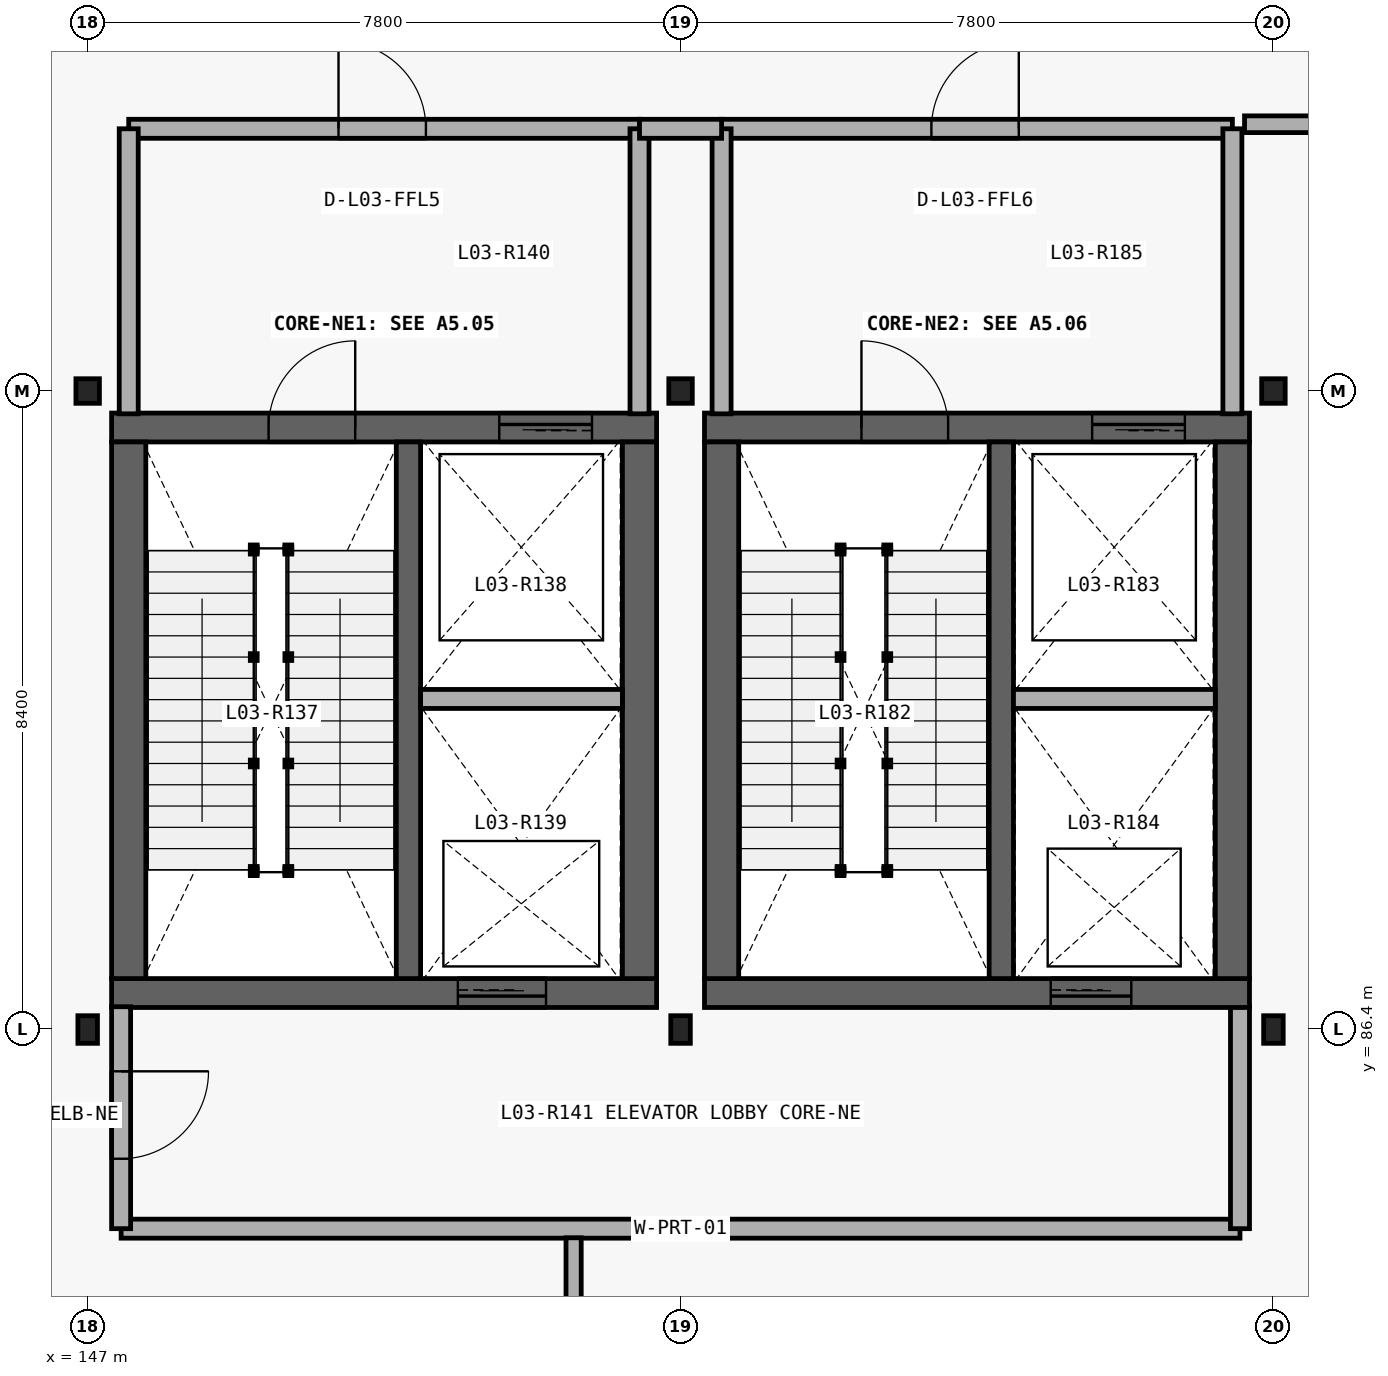
"""IFC4 building model, lengths in metres.
Left out: names, types, materials, properties, quantities, classifications, styles, units other than length and angle.
Written with IfcOpenShell. Run it as: python <this file> out.ifc"""

import sys

from ifc_helpers import new_model, si_unit, direction, frame, frame_2d, origin_with_axes, origin_2d_with_axis, place, context, subcontext, project, spatial, rectangle, i_section, extrude, element, fill, save


model = new_model("IFC4")
c1 = context("Model", 3, precision=1e-05, world=origin_with_axes(), true_north=direction((0.0, 1.0)))
c2 = subcontext(c1, "Body", "Model", "MODEL_VIEW")
j1 = project(units=[si_unit("LENGTHUNIT", "METRE"), si_unit("PLANEANGLEUNIT", "RADIAN")], contexts=[c1])
p1 = place(None, origin_with_axes())
s1 = spatial("IfcSite", under=j1, at=p1, CompositionType="ELEMENT")
p2 = place(p1, origin_with_axes())
s2 = spatial("IfcBuilding", under=s1, at=p2, CompositionType="ELEMENT")
p3 = place(p2, frame((0.0, 0.0, 15.6), z_axis=(0.0, 0.0, 1.0), x_axis=(1.0, 0.0, 0.0)))
s3 = spatial("IfcBuildingStorey", under=s2, at=p3, CompositionType="ELEMENT", Elevation=15.6)
p4 = place(None, frame((147.315, 86.88, 15.6), z_axis=(0.0, 0.0, 1.0), x_axis=(1.0, 0.0, 0.0)))
e1 = element("IfcWall", 1, at=p4, inside=s3, PredefinedType="SHEAR", context=c2, shape_type="SweptSolid", body=[
    extrude(rectangle(XDim=7.17, YDim=0.38, at=frame_2d((3.585, 0.0), x_axis=(1.0, 0.0))), origin_with_axes(), (0.0, 0.0, 1.0), 4.8),
])
p5 = place(None, frame((152.45, 86.88, 15.6), z_axis=(0.0, 0.0, 1.0), x_axis=(1.0, 0.0, 0.0)))
e2 = element("IfcOpeningElement", 2, at=p5, cuts=e1, PredefinedType="OPENING", context=c2, shape_type="SweptSolid", body=[
    extrude(rectangle(XDim=1.16, YDim=2.2, at=frame_2d((0.0, 1.1), x_axis=(1.0, 0.0))), frame((0.0, 0.2, 0.0), z_axis=(0.0, -1.0, 0.0), x_axis=(1.0, 0.0, 0.0)), (0.0, 0.0, 1.0), 0.4),
])
p6 = place(None, frame((154.485, 94.32, 15.6), z_axis=(0.0, 0.0, 1.0), x_axis=(-1.0, 0.0, 0.0)))
e3 = element("IfcWall", 3, at=p6, inside=s3, PredefinedType="SHEAR", context=c2, shape_type="SweptSolid", body=[
    extrude(rectangle(XDim=7.17, YDim=0.38, at=frame_2d((3.585, 0.0), x_axis=(1.0, 0.0))), origin_with_axes(), (0.0, 0.0, 1.0), 4.8),
])
p7 = place(None, frame((149.95, 94.32, 15.6), z_axis=(0.0, 0.0, 1.0), x_axis=(-1.0, 0.0, 0.0)))
e4 = element("IfcOpeningElement", 4, at=p7, cuts=e3, PredefinedType="OPENING", context=c2, shape_type="SweptSolid", body=[
    extrude(rectangle(XDim=1.14, YDim=2.18, at=frame_2d((0.0, 1.09), x_axis=(1.0, 0.0))), frame((0.0, 0.2, 0.0), z_axis=(0.0, -1.0, 0.0), x_axis=(1.0, 0.0, 0.0)), (0.0, 0.0, 1.0), 0.4),
])
p8 = place(None, frame((153.025, 94.32, 15.6), z_axis=(0.0, 0.0, 1.0), x_axis=(-1.0, 0.0, 0.0)))
e5 = element("IfcOpeningElement", 5, at=p8, cuts=e3, PredefinedType="OPENING", context=c2, shape_type="SweptSolid", body=[
    extrude(rectangle(XDim=1.22, YDim=2.28, at=frame_2d((0.0, 1.14), x_axis=(1.0, 0.0))), frame((0.0, 0.2, 0.0), z_axis=(0.0, -1.0, 0.0), x_axis=(1.0, 0.0, 0.0)), (0.0, 0.0, 1.0), 0.4),
])
for number, where, z_axis, x_axis in (
    (6, (154.26, 87.07, 15.6), (0.0, 0.0, 1.0), (0.0, 1.0, 0.0)),
    (7, (147.54, 94.13, 15.6), (0.0, 0.0, 1.0), (0.0, -1.0, 0.0)),
):
    element("IfcWall", number, at=place(None, frame(where, z_axis=z_axis, x_axis=x_axis)), inside=s3, PredefinedType="SHEAR", context=c2, shape_type="SweptSolid", body=[
        extrude(rectangle(XDim=7.06, YDim=0.45, at=frame_2d((3.53, 0.0), x_axis=(1.0, 0.0))), origin_with_axes(), (0.0, 0.0, 1.0), 4.8),
    ])
p9 = place(None, frame((151.22, 87.07, 15.6), z_axis=(0.0, 0.0, 1.0), x_axis=(0.0, 1.0, 0.0)))
e8 = element("IfcWall", 8, at=p9, inside=s3, PredefinedType="SHEAR", context=c2, shape_type="SweptSolid", body=[
    extrude(rectangle(XDim=7.06, YDim=0.32, at=frame_2d((3.53, 0.0), x_axis=(1.0, 0.0))), origin_with_axes(), (0.0, 0.0, 1.0), 4.8),
])
p10 = place(None, frame((151.38, 90.749, 15.6), z_axis=(0.0, 0.0, 1.0), x_axis=(1.0, 0.0, 0.0)))
e9 = element("IfcWall", 9, at=p10, inside=s3, PredefinedType="PARTITIONING", context=c2, shape_type="SweptSolid", body=[
    extrude(rectangle(XDim=2.655, YDim=0.25, at=frame_2d((1.327, 0.0), x_axis=(1.0, 0.0))), origin_with_axes(), (0.0, 0.0, 1.0), 4.48),
])
p11 = place(None, frame((154.26, 98.25, 15.6), z_axis=(0.0, 0.0, 1.0), x_axis=(-1.0, 0.0, 0.0)))
e10 = element("IfcWall", 10, at=p11, inside=s3, PredefinedType="PARTITIONING", context=c2, shape_type="SweptSolid", body=[
    extrude(rectangle(XDim=6.72, YDim=0.25, at=frame_2d((3.36, 0.0), x_axis=(1.0, 0.0))), origin_with_axes(), (0.0, 0.0, 1.0), 4.48),
])
p12 = place(None, frame((150.875, 98.25, 15.6), z_axis=(0.0, 0.0, 1.0), x_axis=(-1.0, 0.0, 0.0)))
e11 = element("IfcOpeningElement", 11, at=p12, cuts=e10, PredefinedType="OPENING", context=c2, shape_type="SweptSolid", body=[
    extrude(rectangle(XDim=1.15, YDim=2.25, at=frame_2d((0.0, 1.125), x_axis=(1.0, 0.0))), frame((0.0, 0.135, 0.0), z_axis=(0.0, -1.0, 0.0), x_axis=(1.0, 0.0, 0.0)), (0.0, 0.0, 1.0), 0.27),
])
for number, where, z_axis, x_axis in (
    (12, (147.54, 94.5, 15.6), (0.0, 0.0, 1.0), (0.0, 1.0, 0.0)),
    (13, (154.26, 94.5, 15.6), (0.0, 0.0, 1.0), (0.0, 1.0, 0.0)),
):
    element("IfcWall", number, at=place(None, frame(where, z_axis=z_axis, x_axis=x_axis)), inside=s3, PredefinedType="PARTITIONING", context=c2, shape_type="SweptSolid", body=[
        extrude(rectangle(XDim=3.75, YDim=0.25, at=frame_2d((1.875, 0.0), x_axis=(1.0, 0.0))), origin_with_axes(), (0.0, 0.0, 1.0), 4.48),
    ])
p13 = place(None, frame((147.44, 83.78, 15.6), z_axis=(0.0, 0.0, 1.0), x_axis=(1.0, 0.0, 0.0)))
e14 = element("IfcWall", 14, at=p13, inside=s3, PredefinedType="PARTITIONING", context=c2, shape_type="SweptSolid", body=[
    extrude(rectangle(XDim=14.72, YDim=0.25, at=frame_2d((7.36, 0.0), x_axis=(1.0, 0.0))), origin_with_axes(), (0.0, 0.0, 1.0), 3.95),
])
p14 = place(None, frame((162.16, 83.78, 15.6), z_axis=(0.0, 0.0, 1.0), x_axis=(0.0, 1.0, 0.0)))
e15 = element("IfcWall", 15, at=p14, inside=s3, PredefinedType="PARTITIONING", context=c2, shape_type="SweptSolid", body=[
    extrude(rectangle(XDim=2.92, YDim=0.25, at=frame_2d((1.46, 0.0), x_axis=(1.0, 0.0))), origin_with_axes(), (0.0, 0.0, 1.0), 4.48),
])
p15 = place(None, frame((147.44, 86.7, 15.6), z_axis=(0.0, 0.0, 1.0), x_axis=(0.0, -1.0, 0.0)))
e16 = element("IfcWall", 16, at=p15, inside=s3, PredefinedType="PARTITIONING", context=c2, shape_type="SweptSolid", body=[
    extrude(rectangle(XDim=2.92, YDim=0.25, at=frame_2d((1.46, 0.0), x_axis=(1.0, 0.0))), origin_with_axes(), (0.0, 0.0, 1.0), 4.48),
])
p16 = place(None, frame((147.44, 85.275, 15.6), z_axis=(0.0, 0.0, 1.0), x_axis=(0.0, -1.0, 0.0)))
e17 = element("IfcOpeningElement", 17, at=p16, cuts=e16, PredefinedType="OPENING", context=c2, shape_type="SweptSolid", body=[
    extrude(rectangle(XDim=1.15, YDim=2.25, at=frame_2d((0.0, 1.125), x_axis=(1.0, 0.0))), frame((0.0, 0.135, 0.0), z_axis=(0.0, -1.0, 0.0), x_axis=(1.0, 0.0, 0.0)), (0.0, 0.0, 1.0), 0.27),
])
p17 = place(None, frame((155.115, 86.88, 15.6), z_axis=(0.0, 0.0, 1.0), x_axis=(1.0, 0.0, 0.0)))
e18 = element("IfcWall", 18, at=p17, inside=s3, PredefinedType="SHEAR", context=c2, shape_type="SweptSolid", body=[
    extrude(rectangle(XDim=7.17, YDim=0.38, at=frame_2d((3.585, 0.0), x_axis=(1.0, 0.0))), origin_with_axes(), (0.0, 0.0, 1.0), 4.8),
])
p18 = place(None, frame((160.2, 86.88, 15.6), z_axis=(0.0, 0.0, 1.0), x_axis=(1.0, 0.0, 0.0)))
e19 = element("IfcOpeningElement", 19, at=p18, cuts=e18, PredefinedType="OPENING", context=c2, shape_type="SweptSolid", body=[
    extrude(rectangle(XDim=1.06, YDim=2.16, at=frame_2d((0.0, 1.08), x_axis=(1.0, 0.0))), frame((0.0, 0.2, 0.0), z_axis=(0.0, -1.0, 0.0), x_axis=(1.0, 0.0, 0.0)), (0.0, 0.0, 1.0), 0.4),
])
p19 = place(None, frame((162.285, 94.32, 15.6), z_axis=(0.0, 0.0, 1.0), x_axis=(-1.0, 0.0, 0.0)))
e20 = element("IfcWall", 20, at=p19, inside=s3, PredefinedType="SHEAR", context=c2, shape_type="SweptSolid", body=[
    extrude(rectangle(XDim=7.17, YDim=0.38, at=frame_2d((3.585, 0.0), x_axis=(1.0, 0.0))), origin_with_axes(), (0.0, 0.0, 1.0), 4.8),
])
p20 = place(None, frame((157.75, 94.32, 15.6), z_axis=(0.0, 0.0, 1.0), x_axis=(-1.0, 0.0, 0.0)))
e21 = element("IfcOpeningElement", 21, at=p20, cuts=e20, PredefinedType="OPENING", context=c2, shape_type="SweptSolid", body=[
    extrude(rectangle(XDim=1.14, YDim=2.18, at=frame_2d((0.0, 1.09), x_axis=(1.0, 0.0))), frame((0.0, 0.2, 0.0), z_axis=(0.0, -1.0, 0.0), x_axis=(1.0, 0.0, 0.0)), (0.0, 0.0, 1.0), 0.4),
])
p21 = place(None, frame((160.825, 94.32, 15.6), z_axis=(0.0, 0.0, 1.0), x_axis=(-1.0, 0.0, 0.0)))
e22 = element("IfcOpeningElement", 22, at=p21, cuts=e20, PredefinedType="OPENING", context=c2, shape_type="SweptSolid", body=[
    extrude(rectangle(XDim=1.22, YDim=2.28, at=frame_2d((0.0, 1.14), x_axis=(1.0, 0.0))), frame((0.0, 0.2, 0.0), z_axis=(0.0, -1.0, 0.0), x_axis=(1.0, 0.0, 0.0)), (0.0, 0.0, 1.0), 0.4),
])
for number, where, z_axis, x_axis in (
    (23, (162.06, 87.07, 15.6), (0.0, 0.0, 1.0), (0.0, 1.0, 0.0)),
    (24, (155.34, 94.13, 15.6), (0.0, 0.0, 1.0), (0.0, -1.0, 0.0)),
):
    element("IfcWall", number, at=place(None, frame(where, z_axis=z_axis, x_axis=x_axis)), inside=s3, PredefinedType="SHEAR", context=c2, shape_type="SweptSolid", body=[
        extrude(rectangle(XDim=7.06, YDim=0.45, at=frame_2d((3.53, 0.0), x_axis=(1.0, 0.0))), origin_with_axes(), (0.0, 0.0, 1.0), 4.8),
    ])
p22 = place(None, frame((159.02, 87.07, 15.6), z_axis=(0.0, 0.0, 1.0), x_axis=(0.0, 1.0, 0.0)))
e25 = element("IfcWall", 25, at=p22, inside=s3, PredefinedType="SHEAR", context=c2, shape_type="SweptSolid", body=[
    extrude(rectangle(XDim=7.06, YDim=0.32, at=frame_2d((3.53, 0.0), x_axis=(1.0, 0.0))), origin_with_axes(), (0.0, 0.0, 1.0), 4.8),
])
p23 = place(None, frame((159.18, 90.749, 15.6), z_axis=(0.0, 0.0, 1.0), x_axis=(1.0, 0.0, 0.0)))
e26 = element("IfcWall", 26, at=p23, inside=s3, PredefinedType="PARTITIONING", context=c2, shape_type="SweptSolid", body=[
    extrude(rectangle(XDim=2.655, YDim=0.25, at=frame_2d((1.327, 0.0), x_axis=(1.0, 0.0))), origin_with_axes(), (0.0, 0.0, 1.0), 4.48),
])
p24 = place(None, frame((162.06, 98.25, 15.6), z_axis=(0.0, 0.0, 1.0), x_axis=(-1.0, 0.0, 0.0)))
e27 = element("IfcWall", 27, at=p24, inside=s3, PredefinedType="PARTITIONING", context=c2, shape_type="SweptSolid", body=[
    extrude(rectangle(XDim=6.72, YDim=0.25, at=frame_2d((3.36, 0.0), x_axis=(1.0, 0.0))), origin_with_axes(), (0.0, 0.0, 1.0), 4.48),
])
p25 = place(None, frame((158.675, 98.25, 15.6), z_axis=(0.0, 0.0, 1.0), x_axis=(-1.0, 0.0, 0.0)))
e28 = element("IfcOpeningElement", 28, at=p25, cuts=e27, PredefinedType="OPENING", context=c2, shape_type="SweptSolid", body=[
    extrude(rectangle(XDim=1.15, YDim=2.25, at=frame_2d((0.0, 1.125), x_axis=(1.0, 0.0))), frame((0.0, 0.135, 0.0), z_axis=(0.0, -1.0, 0.0), x_axis=(1.0, 0.0, 0.0)), (0.0, 0.0, 1.0), 0.27),
])
for number, where, z_axis, x_axis in (
    (29, (155.34, 94.5, 15.6), (0.0, 0.0, 1.0), (0.0, 1.0, 0.0)),
    (30, (162.06, 94.5, 15.6), (0.0, 0.0, 1.0), (0.0, 1.0, 0.0)),
):
    element("IfcWall", number, at=place(None, frame(where, z_axis=z_axis, x_axis=x_axis)), inside=s3, PredefinedType="PARTITIONING", context=c2, shape_type="SweptSolid", body=[
        extrude(rectangle(XDim=3.75, YDim=0.25, at=frame_2d((1.875, 0.0), x_axis=(1.0, 0.0))), origin_with_axes(), (0.0, 0.0, 1.0), 4.48),
    ])
p26 = place(None, frame((154.26, 98.25, 15.6), z_axis=(0.0, 0.0, 1.0), x_axis=(1.0, 0.0, 0.0)))
e31 = element("IfcWall", 31, at=p26, inside=s3, PredefinedType="PARTITIONING", context=c2, shape_type="SweptSolid", body=[
    extrude(rectangle(XDim=1.08, YDim=0.25, at=frame_2d((0.54, 0.0), x_axis=(1.0, 0.0))), origin_with_axes(), (0.0, 0.0, 1.0), 4.48),
])
p27 = place(None, frame((162.22, 98.31, 15.6), z_axis=(0.0, 0.0, 1.0), x_axis=(1.0, 0.0, 0.0)))
e32 = element("IfcWall", 32, at=p27, inside=s3, PredefinedType="PARTITIONING", context=c2, shape_type="SweptSolid", body=[
    extrude(rectangle(XDim=7.04, YDim=0.22, at=frame_2d((3.52, 0.0), x_axis=(1.0, 0.0))), origin_with_axes(), (0.0, 0.0, 1.0), 4.48),
])
p28 = place(None, frame((164.242, 98.31, 15.6), z_axis=(0.0, 0.0, 1.0), x_axis=(1.0, 0.0, 0.0)))
e33 = element("IfcOpeningElement", 33, at=p28, cuts=e32, PredefinedType="OPENING", context=c2, shape_type="SweptSolid", body=[
    extrude(rectangle(XDim=0.94, YDim=2.3, at=frame_2d((0.0, 1.15), x_axis=(1.0, 0.0))), frame((0.0, 0.12, 0.0), z_axis=(0.0, -1.0, 0.0), x_axis=(1.0, 0.0, 0.0)), (0.0, 0.0, 1.0), 0.24),
])
p29 = place(None, frame((167.438, 98.31, 15.6), z_axis=(0.0, 0.0, 1.0), x_axis=(1.0, 0.0, 0.0)))
e34 = element("IfcOpeningElement", 34, at=p29, cuts=e32, PredefinedType="OPENING", context=c2, shape_type="SweptSolid", body=[
    extrude(rectangle(XDim=0.95, YDim=2.1, at=frame_2d((0.0, 1.05), x_axis=(1.0, 0.0))), frame((0.0, 0.12, 0.0), z_axis=(0.0, -1.0, 0.0), x_axis=(1.0, 0.0, 0.0)), (0.0, 0.0, 1.0), 0.24),
])
p30 = place(None, frame((153.393, 69.74, 15.6), z_axis=(0.0, 0.0, 1.0), x_axis=(0.0, 1.0, 0.0)))
e35 = element("IfcWall", 35, at=p30, inside=s3, PredefinedType="PARTITIONING", context=c2, shape_type="SweptSolid", body=[
    extrude(rectangle(XDim=13.92, YDim=0.2, at=frame_2d((6.96, 0.0), x_axis=(1.0, 0.0))), origin_with_axes(), (0.0, 0.0, 1.0), 4.48),
])
p31 = place(None, frame((147.0, 86.4, 15.6), z_axis=(0.0, 0.0, 1.0), x_axis=(1.0, 0.0, 0.0)))
e36 = element("IfcColumn", 36, at=p31, inside=s3, PredefinedType="COLUMN", context=c2, shape_type="SweptSolid", body=[
    extrude(i_section(OverallWidth=0.257, OverallDepth=0.363, WebThickness=0.013, FlangeThickness=0.022, at=origin_2d_with_axis()), origin_with_axes(), (0.0, 0.0, 1.0), 4.8),
])
p32 = place(None, frame((147.0, 94.8, 15.6), z_axis=(0.0, 0.0, 1.0), x_axis=(1.0, 0.0, 0.0)))
e37 = element("IfcColumn", 37, at=p32, inside=s3, PredefinedType="COLUMN", context=c2, shape_type="SweptSolid", body=[
    extrude(i_section(OverallWidth=0.309, OverallDepth=0.323, WebThickness=0.014, FlangeThickness=0.023, at=origin_2d_with_axis()), origin_with_axes(), (0.0, 0.0, 1.0), 4.8),
])
p33 = place(None, frame((154.8, 86.4, 15.6), z_axis=(0.0, 0.0, 1.0), x_axis=(1.0, 0.0, 0.0)))
e38 = element("IfcColumn", 38, at=p33, inside=s3, PredefinedType="COLUMN", context=c2, shape_type="SweptSolid", body=[
    extrude(i_section(OverallWidth=0.257, OverallDepth=0.363, WebThickness=0.013, FlangeThickness=0.022, at=origin_2d_with_axis()), origin_with_axes(), (0.0, 0.0, 1.0), 4.8),
])
p34 = place(None, frame((154.8, 94.8, 15.6), z_axis=(0.0, 0.0, 1.0), x_axis=(1.0, 0.0, 0.0)))
e39 = element("IfcColumn", 39, at=p34, inside=s3, PredefinedType="COLUMN", context=c2, shape_type="SweptSolid", body=[
    extrude(i_section(OverallWidth=0.309, OverallDepth=0.323, WebThickness=0.014, FlangeThickness=0.023, at=origin_2d_with_axis()), origin_with_axes(), (0.0, 0.0, 1.0), 4.8),
])
p35 = place(None, frame((162.6, 86.4, 15.6), z_axis=(0.0, 0.0, 1.0), x_axis=(1.0, 0.0, 0.0)))
e40 = element("IfcColumn", 40, at=p35, inside=s3, PredefinedType="COLUMN", context=c2, shape_type="SweptSolid", body=[
    extrude(i_section(OverallWidth=0.257, OverallDepth=0.363, WebThickness=0.013, FlangeThickness=0.022, at=origin_2d_with_axis()), origin_with_axes(), (0.0, 0.0, 1.0), 4.8),
])
p36 = place(None, frame((162.6, 94.8, 15.6), z_axis=(0.0, 0.0, 1.0), x_axis=(1.0, 0.0, 0.0)))
e41 = element("IfcColumn", 41, at=p36, inside=s3, PredefinedType="COLUMN", context=c2, shape_type="SweptSolid", body=[
    extrude(i_section(OverallWidth=0.309, OverallDepth=0.323, WebThickness=0.014, FlangeThickness=0.023, at=origin_2d_with_axis()), origin_with_axes(), (0.0, 0.0, 1.0), 4.8),
])
p37 = place(None, frame((149.95, 94.32, 15.6), z_axis=(0.0, 0.0, 1.0), x_axis=(1.0, 0.0, 0.0)))
e42 = element("IfcDoor", 42, at=p37, inside=s3, OperationType="SINGLE_SWING_LEFT", PredefinedType="DOOR", context=c2, shape_type="SweptSolid", body=[
    extrude(rectangle(XDim=1.14, YDim=2.18, at=frame_2d((0.0, 1.09), x_axis=(1.0, 0.0))), frame((0.0, 0.04, 0.0), z_axis=(0.0, -1.0, 0.0), x_axis=(1.0, 0.0, 0.0)), (0.0, 0.0, 1.0), 0.08),
])
fill(e4, e42)
p38 = place(None, frame((153.025, 94.32, 15.6), z_axis=(0.0, 0.0, 1.0), x_axis=(1.0, 0.0, 0.0)))
e43 = element("IfcDoor", 43, at=p38, inside=s3, OperationType="SLIDING_TO_LEFT", PredefinedType="DOOR", context=c2, shape_type="SweptSolid", body=[
    extrude(rectangle(XDim=1.22, YDim=2.28, at=frame_2d((0.0, 1.14), x_axis=(1.0, 0.0))), frame((0.0, 0.04, 0.0), z_axis=(0.0, -1.0, 0.0), x_axis=(1.0, 0.0, 0.0)), (0.0, 0.0, 1.0), 0.08),
])
fill(e5, e43)
p39 = place(None, frame((152.45, 86.88, 15.6), z_axis=(0.0, 0.0, 1.0), x_axis=(-1.0, 0.0, 0.0)))
e44 = element("IfcDoor", 44, at=p39, inside=s3, OperationType="SLIDING_TO_LEFT", PredefinedType="DOOR", context=c2, shape_type="SweptSolid", body=[
    extrude(rectangle(XDim=1.16, YDim=2.2, at=frame_2d((0.0, 1.1), x_axis=(1.0, 0.0))), frame((0.0, 0.04, 0.0), z_axis=(0.0, -1.0, 0.0), x_axis=(1.0, 0.0, 0.0)), (0.0, 0.0, 1.0), 0.08),
])
fill(e2, e44)
p40 = place(None, frame((150.875, 98.25, 15.6), z_axis=(0.0, 0.0, 1.0), x_axis=(1.0, 0.0, 0.0)))
e45 = element("IfcDoor", 45, at=p40, inside=s3, OperationType="SINGLE_SWING_RIGHT", PredefinedType="DOOR", context=c2, shape_type="SweptSolid", body=[
    extrude(rectangle(XDim=1.15, YDim=2.25, at=frame_2d((0.0, 1.125), x_axis=(1.0, 0.0))), frame((0.0, 0.04, 0.0), z_axis=(0.0, -1.0, 0.0), x_axis=(1.0, 0.0, 0.0)), (0.0, 0.0, 1.0), 0.08),
])
fill(e11, e45)
p41 = place(None, frame((147.44, 85.275, 15.6), z_axis=(0.0, 0.0, 1.0), x_axis=(0.0, -1.0, 0.0)))
e46 = element("IfcDoor", 46, at=p41, inside=s3, OperationType="SINGLE_SWING_LEFT", PredefinedType="DOOR", context=c2, shape_type="SweptSolid", body=[
    extrude(rectangle(XDim=1.15, YDim=2.25, at=frame_2d((0.0, 1.125), x_axis=(1.0, 0.0))), frame((0.0, 0.04, 0.0), z_axis=(0.0, -1.0, 0.0), x_axis=(1.0, 0.0, 0.0)), (0.0, 0.0, 1.0), 0.08),
])
fill(e17, e46)
p42 = place(None, frame((157.75, 94.32, 15.6), z_axis=(0.0, 0.0, 1.0), x_axis=(1.0, 0.0, 0.0)))
e47 = element("IfcDoor", 47, at=p42, inside=s3, OperationType="SINGLE_SWING_RIGHT", PredefinedType="DOOR", context=c2, shape_type="SweptSolid", body=[
    extrude(rectangle(XDim=1.14, YDim=2.18, at=frame_2d((0.0, 1.09), x_axis=(1.0, 0.0))), frame((0.0, 0.04, 0.0), z_axis=(0.0, -1.0, 0.0), x_axis=(1.0, 0.0, 0.0)), (0.0, 0.0, 1.0), 0.08),
])
fill(e21, e47)
p43 = place(None, frame((160.825, 94.32, 15.6), z_axis=(0.0, 0.0, 1.0), x_axis=(1.0, 0.0, 0.0)))
e48 = element("IfcDoor", 48, at=p43, inside=s3, OperationType="SLIDING_TO_LEFT", PredefinedType="DOOR", context=c2, shape_type="SweptSolid", body=[
    extrude(rectangle(XDim=1.22, YDim=2.28, at=frame_2d((0.0, 1.14), x_axis=(1.0, 0.0))), frame((0.0, 0.04, 0.0), z_axis=(0.0, -1.0, 0.0), x_axis=(1.0, 0.0, 0.0)), (0.0, 0.0, 1.0), 0.08),
])
fill(e22, e48)
p44 = place(None, frame((160.2, 86.88, 15.6), z_axis=(0.0, 0.0, 1.0), x_axis=(-1.0, 0.0, 0.0)))
e49 = element("IfcDoor", 49, at=p44, inside=s3, OperationType="SLIDING_TO_LEFT", PredefinedType="DOOR", context=c2, shape_type="SweptSolid", body=[
    extrude(rectangle(XDim=1.06, YDim=2.16, at=frame_2d((0.0, 1.08), x_axis=(1.0, 0.0))), frame((0.0, 0.04, 0.0), z_axis=(0.0, -1.0, 0.0), x_axis=(1.0, 0.0, 0.0)), (0.0, 0.0, 1.0), 0.08),
])
fill(e19, e49)
p45 = place(None, frame((158.675, 98.25, 15.6), z_axis=(0.0, 0.0, 1.0), x_axis=(1.0, 0.0, 0.0)))
e50 = element("IfcDoor", 50, at=p45, inside=s3, OperationType="SINGLE_SWING_LEFT", PredefinedType="DOOR", context=c2, shape_type="SweptSolid", body=[
    extrude(rectangle(XDim=1.15, YDim=2.25, at=frame_2d((0.0, 1.125), x_axis=(1.0, 0.0))), frame((0.0, 0.04, 0.0), z_axis=(0.0, -1.0, 0.0), x_axis=(1.0, 0.0, 0.0)), (0.0, 0.0, 1.0), 0.08),
])
fill(e28, e50)
save(model, sys.argv[1])
